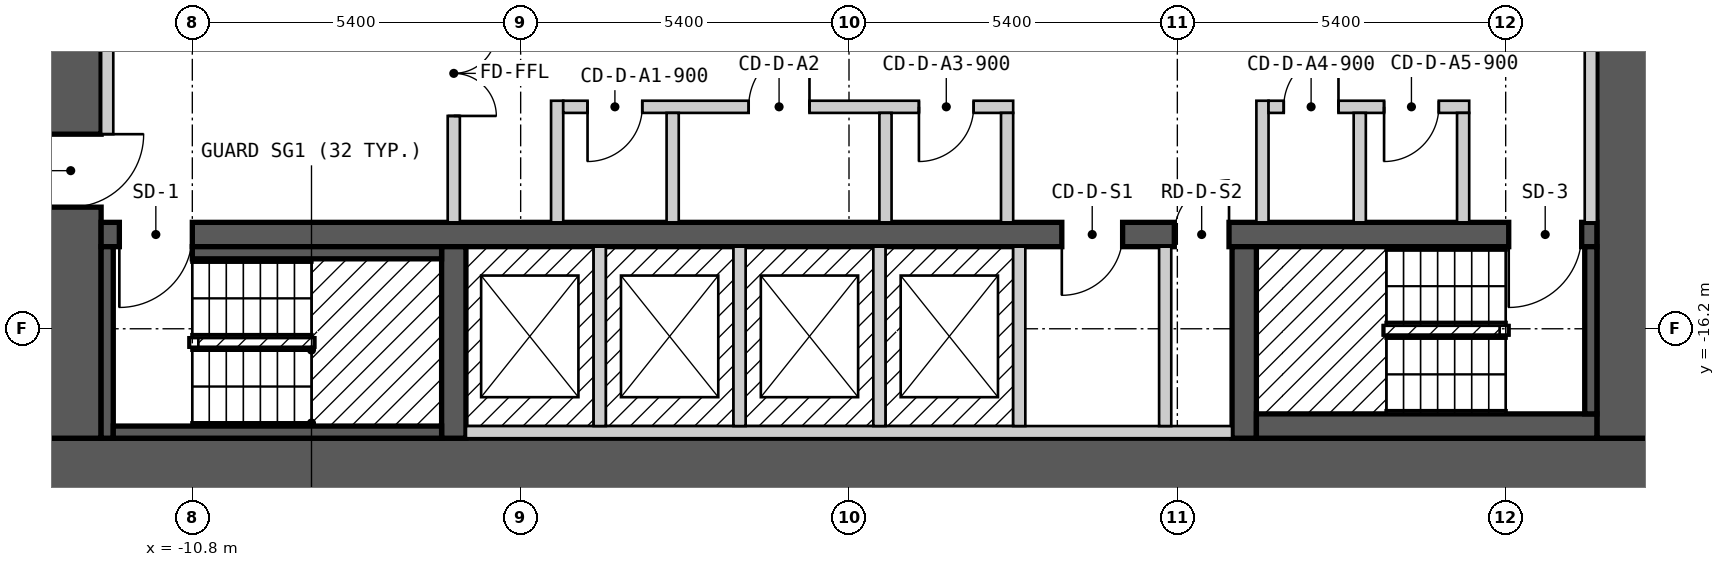
"""IFC4 building model, lengths in metres.
Left out: names, types, materials, properties, quantities, classifications, styles, units other than length and angle.
Written with IfcOpenShell. Run it as: python <this file> out.ifc"""

import sys

from ifc_helpers import new_model, si_unit, direction, frame, frame_2d, origin, place, context, subcontext, project, spatial, rectangle, extrude, element, fill, save


model = new_model("IFC4")
c1 = context("Model", 3, precision=1e-05, world=origin(), true_north=direction((0.0, 1.0)))
c2 = subcontext(c1, "Body", "Model", "MODEL_VIEW")
j1 = project(units=[si_unit("LENGTHUNIT", "METRE"), si_unit("PLANEANGLEUNIT", "RADIAN")], contexts=[c1])
p1 = place(None, origin())
s1 = spatial("IfcSite", under=j1, at=p1, CompositionType="ELEMENT")
p2 = place(p1, origin())
s2 = spatial("IfcBuilding", under=s1, at=p2, CompositionType="ELEMENT")
p3 = place(p2, frame((0.0, 0.0, 66.0)))
s3 = spatial("IfcBuildingStorey", under=s2, at=p3, CompositionType="ELEMENT", Elevation=66.0)
p4 = place(p3, frame((-13.3, -18.5, 0.0), z_axis=(0.0, 0.0, 1.0), x_axis=(1.0, 0.0, 0.0)))
e1 = element("IfcWall", 1, at=p4, inside=s3, PredefinedType="SHEAR", context=c2, shape_type="SweptSolid", body=[
    extrude(rectangle(XDim=26.6, YDim=1.0, at=frame_2d((13.3, 0.0))), origin(), (0.0, 0.0, 1.0), 5.7),
])
p5 = place(p3, frame((-12.8, -18.0, 0.0), z_axis=(0.0, 0.0, 1.0), x_axis=(0.0, 1.0, 0.0)))
e2 = element("IfcWall", 2, at=p5, inside=s3, PredefinedType="SHEAR", context=c2, shape_type="SweptSolid", body=[
    extrude(rectangle(XDim=12.0, YDim=1.0, at=frame_2d((6.0, 0.0))), origin(), (0.0, 0.0, 1.0), 5.7),
])
p6 = place(p5, frame((3.8, 0.0, 0.0)))
e3 = element("IfcOpeningElement", 3, at=p6, cuts=e2, PredefinedType="OPENING", context=c2, shape_type="SweptSolid", body=[
    extrude(rectangle(XDim=1.2, YDim=2.1, at=frame_2d((0.6, 1.05))), frame((0.0, 0.51, 0.0), z_axis=(0.0, -1.0, 0.0), x_axis=(1.0, 0.0, 0.0)), (0.0, 0.0, 1.0), 1.02),
])
p7 = place(p3, frame((12.8, -18.0, 0.0), z_axis=(0.0, 0.0, 1.0), x_axis=(0.0, 1.0, 0.0)))
e4 = element("IfcWall", 4, at=p7, inside=s3, PredefinedType="SHEAR", context=c2, shape_type="SweptSolid", body=[
    extrude(rectangle(XDim=12.0, YDim=1.0, at=frame_2d((6.0, 0.0))), origin(), (0.0, 0.0, 1.0), 5.7),
])
p8 = place(p3, frame((-12.3, -14.65, 0.0), z_axis=(0.0, 0.0, 1.0), x_axis=(1.0, 0.0, 0.0)))
e5 = element("IfcWall", 5, at=p8, inside=s3, PredefinedType="SHEAR", context=c2, shape_type="SweptSolid", body=[
    extrude(rectangle(XDim=24.6, YDim=0.4, at=frame_2d((12.3, 0.0))), origin(), (0.0, 0.0, 1.0), 5.7),
])
p9 = place(p8, frame((1.5, 0.0, 0.0), z_axis=(0.0, 0.0, 1.0), x_axis=(-1.0, 0.0, 0.0)))
e6 = element("IfcOpeningElement", 6, at=p9, cuts=e5, PredefinedType="OPENING", context=c2, shape_type="SweptSolid", body=[
    extrude(rectangle(XDim=1.2, YDim=2.1, at=frame_2d((0.6, 1.05))), frame((0.0, 0.21, 0.0), z_axis=(0.0, -1.0, 0.0), x_axis=(1.0, 0.0, 0.0)), (0.0, 0.0, 1.0), 0.42),
])
p10 = place(p8, frame((24.35, 0.0, 0.0), z_axis=(0.0, 0.0, 1.0), x_axis=(-1.0, 0.0, 0.0)))
e7 = element("IfcOpeningElement", 7, at=p10, cuts=e5, PredefinedType="OPENING", context=c2, shape_type="SweptSolid", body=[
    extrude(rectangle(XDim=1.2, YDim=2.1, at=frame_2d((0.6, 1.05))), frame((0.0, 0.21, 0.0), z_axis=(0.0, -1.0, 0.0), x_axis=(1.0, 0.0, 0.0)), (0.0, 0.0, 1.0), 0.42),
])
p11 = place(p8, frame((16.8, 0.0, 0.0), z_axis=(0.0, 0.0, 1.0), x_axis=(-1.0, 0.0, 0.0)))
e8 = element("IfcOpeningElement", 8, at=p11, cuts=e5, PredefinedType="OPENING", context=c2, shape_type="SweptSolid", body=[
    extrude(rectangle(XDim=1.0, YDim=2.1, at=frame_2d((0.5, 1.05))), frame((0.0, 0.21, 0.0), z_axis=(0.0, -1.0, 0.0), x_axis=(1.0, 0.0, 0.0)), (0.0, 0.0, 1.0), 0.42),
])
p12 = place(p8, frame((18.55, 0.0, 0.0), z_axis=(0.0, 0.0, 1.0), x_axis=(-1.0, 0.0, 0.0)))
e9 = element("IfcOpeningElement", 9, at=p12, cuts=e5, PredefinedType="OPENING", context=c2, shape_type="SweptSolid", body=[
    extrude(rectangle(XDim=0.9, YDim=2.1, at=frame_2d((0.45, 1.05))), frame((0.0, 0.21, 0.0), z_axis=(0.0, -1.0, 0.0), x_axis=(1.0, 0.0, 0.0)), (0.0, 0.0, 1.0), 0.42),
])
for number, where, z_axis, x_axis in (
    (10, (-6.5, -18.0, 0.0), (0.0, 0.0, 1.0), (0.0, 1.0, 0.0)),
    (11, (6.5, -18.0, 0.0), (0.0, 0.0, 1.0), (0.0, 1.0, 0.0)),
):
    element("IfcWall", number, at=place(p3, frame(where, z_axis=z_axis, x_axis=x_axis)), inside=s3, PredefinedType="SHEAR", context=c2, shape_type="SweptSolid", body=[
        extrude(rectangle(XDim=3.15, YDim=0.4, at=frame_2d((1.575, 0.0))), origin(), (0.0, 0.0, 1.0), 5.7),
    ])
p13 = place(p3, frame((-12.2, -18.0, 0.0), z_axis=(0.0, 0.0, 1.0), x_axis=(0.0, 1.0, 0.0)))
e12 = element("IfcWall", 12, at=p13, inside=s3, PredefinedType="SOLIDWALL", context=c2, shape_type="SweptSolid", body=[
    extrude(rectangle(XDim=3.15, YDim=0.2, at=frame_2d((1.575, 0.0))), origin(), (0.0, 0.0, 1.0), 5.7),
])
p14 = place(p3, frame((-12.2, -13.0, 0.0), z_axis=(0.0, 0.0, 1.0), x_axis=(0.0, 1.0, 0.0)))
e13 = element("IfcWall", 13, at=p14, inside=s3, PredefinedType="PARTITIONING", context=c2, shape_type="SweptSolid", body=[
    extrude(rectangle(XDim=3.45, YDim=0.2, at=frame_2d((1.725, 0.0))), origin(), (0.0, 0.0, 1.0), 5.7),
])
p15 = place(p3, frame((-12.1, -17.9, 0.0), z_axis=(0.0, 0.0, 1.0), x_axis=(1.0, 0.0, 0.0)))
e14 = element("IfcWall", 14, at=p15, inside=s3, PredefinedType="SOLIDWALL", context=c2, shape_type="SweptSolid", body=[
    extrude(rectangle(XDim=5.4, YDim=0.2, at=frame_2d((2.7, 0.0))), origin(), (0.0, 0.0, 1.0), 5.7),
])
p16 = place(p3, frame((-10.8, -14.95, 0.0), z_axis=(0.0, 0.0, 1.0), x_axis=(1.0, 0.0, 0.0)))
e15 = element("IfcWall", 15, at=p16, inside=s3, PredefinedType="SOLIDWALL", context=c2, shape_type="SweptSolid", body=[
    extrude(rectangle(XDim=4.1, YDim=0.2, at=frame_2d((2.05, 0.0))), origin(), (0.0, 0.0, 1.0), 5.7),
])
p17 = place(p3, frame((-6.5, -14.45, 0.0), z_axis=(0.0, 0.0, 1.0), x_axis=(0.0, 1.0, 0.0)))
e16 = element("IfcWall", 16, at=p17, inside=s3, PredefinedType="PARTITIONING", context=c2, shape_type="SweptSolid", body=[
    extrude(rectangle(XDim=4.9, YDim=0.2, at=frame_2d((2.45, 0.0))), origin(), (0.0, 0.0, 1.0), 5.7),
])
p18 = place(p17, frame((3.15, 0.0, 0.0), z_axis=(0.0, 0.0, 1.0), x_axis=(-1.0, 0.0, 0.0)))
e17 = element("IfcOpeningElement", 17, at=p18, cuts=e16, PredefinedType="OPENING", context=c2, shape_type="SweptSolid", body=[
    extrude(rectangle(XDim=1.4, YDim=2.1, at=frame_2d((0.7, 1.05))), frame((0.0, 0.11, 0.0), z_axis=(0.0, -1.0, 0.0), x_axis=(1.0, 0.0, 0.0)), (0.0, 0.0, 1.0), 0.22),
])
p19 = place(p3, frame((-6.3, -17.9, 0.0), z_axis=(0.0, 0.0, 1.0), x_axis=(1.0, 0.0, 0.0)))
e18 = element("IfcWall", 18, at=p19, inside=s3, PredefinedType="SOLIDWALL", context=c2, shape_type="SweptSolid", body=[
    extrude(rectangle(XDim=12.6, YDim=0.2, at=frame_2d((6.3, 0.0))), origin(), (0.0, 0.0, 1.0), 5.7),
])
p20 = place(p3, frame((-4.8, -14.45, 0.0), z_axis=(0.0, 0.0, 1.0), x_axis=(0.0, 1.0, 0.0)))
e19 = element("IfcWall", 19, at=p20, inside=s3, PredefinedType="PARTITIONING", context=c2, shape_type="SweptSolid", body=[
    extrude(rectangle(XDim=2.0, YDim=0.2, at=frame_2d((1.0, 0.0))), origin(), (0.0, 0.0, 1.0), 5.7),
])
p21 = place(p3, frame((-4.7, -12.55, 0.0), z_axis=(0.0, 0.0, 1.0), x_axis=(1.0, 0.0, 0.0)))
e20 = element("IfcWall", 20, at=p21, inside=s3, PredefinedType="PARTITIONING", context=c2, shape_type="SweptSolid", body=[
    extrude(rectangle(XDim=7.4, YDim=0.2, at=frame_2d((3.7, 0.0))), origin(), (0.0, 0.0, 1.0), 5.7),
])
p22 = place(p21, frame((1.3, 0.0, 0.0), z_axis=(0.0, 0.0, 1.0), x_axis=(-1.0, 0.0, 0.0)))
e21 = element("IfcOpeningElement", 21, at=p22, cuts=e20, PredefinedType="OPENING", context=c2, shape_type="SweptSolid", body=[
    extrude(rectangle(XDim=0.9, YDim=2.1, at=frame_2d((0.45, 1.05))), frame((0.0, 0.11, 0.0), z_axis=(0.0, -1.0, 0.0), x_axis=(1.0, 0.0, 0.0)), (0.0, 0.0, 1.0), 0.22),
])
p23 = place(p21, frame((4.05, 0.0, 0.0), z_axis=(0.0, 0.0, 1.0), x_axis=(-1.0, 0.0, 0.0)))
e22 = element("IfcOpeningElement", 22, at=p23, cuts=e20, PredefinedType="OPENING", context=c2, shape_type="SweptSolid", body=[
    extrude(rectangle(XDim=1.0, YDim=2.1, at=frame_2d((0.5, 1.05))), frame((0.0, 0.11, 0.0), z_axis=(0.0, -1.0, 0.0), x_axis=(1.0, 0.0, 0.0)), (0.0, 0.0, 1.0), 0.22),
])
p24 = place(p21, frame((6.75, 0.0, 0.0), z_axis=(0.0, 0.0, 1.0), x_axis=(-1.0, 0.0, 0.0)))
e23 = element("IfcOpeningElement", 23, at=p24, cuts=e20, PredefinedType="OPENING", context=c2, shape_type="SweptSolid", body=[
    extrude(rectangle(XDim=0.9, YDim=2.1, at=frame_2d((0.45, 1.05))), frame((0.0, 0.11, 0.0), z_axis=(0.0, -1.0, 0.0), x_axis=(1.0, 0.0, 0.0)), (0.0, 0.0, 1.0), 0.22),
])
p25 = place(p3, frame((-4.1, -17.8, 0.0), z_axis=(0.0, 0.0, 1.0), x_axis=(0.0, 1.0, 0.0)))
e24 = element("IfcWall", 24, at=p25, inside=s3, PredefinedType="SOLIDWALL", context=c2, shape_type="SweptSolid", body=[
    extrude(rectangle(XDim=2.95, YDim=0.2, at=frame_2d((1.475, 0.0))), origin(), (0.0, 0.0, 1.0), 5.7),
])
p26 = place(p3, frame((-2.9, -14.45, 0.0), z_axis=(0.0, 0.0, 1.0), x_axis=(0.0, 1.0, 0.0)))
e25 = element("IfcWall", 25, at=p26, inside=s3, PredefinedType="PARTITIONING", context=c2, shape_type="SweptSolid", body=[
    extrude(rectangle(XDim=1.8, YDim=0.2, at=frame_2d((0.9, 0.0))), origin(), (0.0, 0.0, 1.0), 5.7),
])
for number, where, z_axis, x_axis in (
    (26, (-1.8, -17.8, 0.0), (0.0, 0.0, 1.0), (0.0, 1.0, 0.0)),
    (27, (0.5, -17.8, 0.0), (0.0, 0.0, 1.0), (0.0, 1.0, 0.0)),
):
    element("IfcWall", number, at=place(p3, frame(where, z_axis=z_axis, x_axis=x_axis)), inside=s3, PredefinedType="SOLIDWALL", context=c2, shape_type="SweptSolid", body=[
        extrude(rectangle(XDim=2.95, YDim=0.2, at=frame_2d((1.475, 0.0))), origin(), (0.0, 0.0, 1.0), 5.7),
    ])
for number, where, z_axis, x_axis in (
    (28, (0.6, -14.45, 0.0), (0.0, 0.0, 1.0), (0.0, 1.0, 0.0)),
    (29, (2.6, -14.45, 0.0), (0.0, 0.0, 1.0), (0.0, 1.0, 0.0)),
):
    element("IfcWall", number, at=place(p3, frame(where, z_axis=z_axis, x_axis=x_axis)), inside=s3, PredefinedType="PARTITIONING", context=c2, shape_type="SweptSolid", body=[
        extrude(rectangle(XDim=1.8, YDim=0.2, at=frame_2d((0.9, 0.0))), origin(), (0.0, 0.0, 1.0), 5.7),
    ])
p27 = place(p3, frame((2.8, -17.8, 0.0), z_axis=(0.0, 0.0, 1.0), x_axis=(0.0, 1.0, 0.0)))
e30 = element("IfcWall", 30, at=p27, inside=s3, PredefinedType="SOLIDWALL", context=c2, shape_type="SweptSolid", body=[
    extrude(rectangle(XDim=2.95, YDim=0.2, at=frame_2d((1.475, 0.0))), origin(), (0.0, 0.0, 1.0), 5.7),
])
p28 = place(p3, frame((5.2, -17.8, 0.0), z_axis=(0.0, 0.0, 1.0), x_axis=(0.0, 1.0, 0.0)))
e31 = element("IfcWall", 31, at=p28, inside=s3, PredefinedType="PARTITIONING", context=c2, shape_type="SweptSolid", body=[
    extrude(rectangle(XDim=2.95, YDim=0.2, at=frame_2d((1.475, 0.0))), origin(), (0.0, 0.0, 1.0), 5.7),
])
p29 = place(p3, frame((6.7, -17.8, 0.0), z_axis=(0.0, 0.0, 1.0), x_axis=(1.0, 0.0, 0.0)))
e32 = element("IfcWall", 32, at=p29, inside=s3, PredefinedType="SOLIDWALL", context=c2, shape_type="SweptSolid", body=[
    extrude(rectangle(XDim=5.6, YDim=0.4, at=frame_2d((2.8, 0.0))), origin(), (0.0, 0.0, 1.0), 5.7),
])
p30 = place(p3, frame((6.8, -14.45, 0.0), z_axis=(0.0, 0.0, 1.0), x_axis=(0.0, 1.0, 0.0)))
e33 = element("IfcWall", 33, at=p30, inside=s3, PredefinedType="PARTITIONING", context=c2, shape_type="SweptSolid", body=[
    extrude(rectangle(XDim=2.0, YDim=0.2, at=frame_2d((1.0, 0.0))), origin(), (0.0, 0.0, 1.0), 5.7),
])
p31 = place(p3, frame((6.9, -12.55, 0.0), z_axis=(0.0, 0.0, 1.0), x_axis=(1.0, 0.0, 0.0)))
e34 = element("IfcWall", 34, at=p31, inside=s3, PredefinedType="PARTITIONING", context=c2, shape_type="SweptSolid", body=[
    extrude(rectangle(XDim=3.3, YDim=0.2, at=frame_2d((1.65, 0.0))), origin(), (0.0, 0.0, 1.0), 5.7),
])
p32 = place(p31, frame((1.15, 0.0, 0.0), z_axis=(0.0, 0.0, 1.0), x_axis=(-1.0, 0.0, 0.0)))
e35 = element("IfcOpeningElement", 35, at=p32, cuts=e34, PredefinedType="OPENING", context=c2, shape_type="SweptSolid", body=[
    extrude(rectangle(XDim=0.9, YDim=2.1, at=frame_2d((0.45, 1.05))), frame((0.0, 0.11, 0.0), z_axis=(0.0, -1.0, 0.0), x_axis=(1.0, 0.0, 0.0)), (0.0, 0.0, 1.0), 0.22),
])
p33 = place(p31, frame((2.8, 0.0, 0.0), z_axis=(0.0, 0.0, 1.0), x_axis=(-1.0, 0.0, 0.0)))
e36 = element("IfcOpeningElement", 36, at=p33, cuts=e34, PredefinedType="OPENING", context=c2, shape_type="SweptSolid", body=[
    extrude(rectangle(XDim=0.9, YDim=2.1, at=frame_2d((0.45, 1.05))), frame((0.0, 0.11, 0.0), z_axis=(0.0, -1.0, 0.0), x_axis=(1.0, 0.0, 0.0)), (0.0, 0.0, 1.0), 0.22),
])
for number, where, z_axis, x_axis in (
    (37, (8.4, -14.45, 0.0), (0.0, 0.0, 1.0), (0.0, 1.0, 0.0)),
    (38, (10.1, -14.45, 0.0), (0.0, 0.0, 1.0), (0.0, 1.0, 0.0)),
):
    element("IfcWall", number, at=place(p3, frame(where, z_axis=z_axis, x_axis=x_axis)), inside=s3, PredefinedType="PARTITIONING", context=c2, shape_type="SweptSolid", body=[
        extrude(rectangle(XDim=1.8, YDim=0.2, at=frame_2d((0.9, 0.0))), origin(), (0.0, 0.0, 1.0), 5.7),
    ])
p34 = place(p3, frame((12.2, -17.6, 0.0), z_axis=(0.0, 0.0, 1.0), x_axis=(0.0, 1.0, 0.0)))
e39 = element("IfcWall", 39, at=p34, inside=s3, PredefinedType="SOLIDWALL", context=c2, shape_type="SweptSolid", body=[
    extrude(rectangle(XDim=2.75, YDim=0.2, at=frame_2d((1.375, 0.0))), origin(), (0.0, 0.0, 1.0), 5.7),
])
p35 = place(p3, frame((12.2, -14.45, 0.0), z_axis=(0.0, 0.0, 1.0), x_axis=(0.0, 1.0, 0.0)))
e40 = element("IfcWall", 40, at=p35, inside=s3, PredefinedType="PARTITIONING", context=c2, shape_type="SweptSolid", body=[
    extrude(rectangle(XDim=8.25, YDim=0.2, at=frame_2d((4.125, 0.0))), origin(), (0.0, 0.0, 1.0), 5.7),
])
p36 = place(p9, origin())
e41 = element("IfcDoor", 41, at=p36, inside=s3, OperationType="SINGLE_SWING_RIGHT", PredefinedType="DOOR", context=c2, shape_type="SweptSolid", body=[
    extrude(rectangle(XDim=1.2, YDim=2.1, at=frame_2d((0.6, 1.05))), frame((0.0, 0.025, 0.0), z_axis=(0.0, -1.0, 0.0), x_axis=(1.0, 0.0, 0.0)), (0.0, 0.0, 1.0), 0.05),
])
fill(e6, e41)
p37 = place(p10, origin())
e42 = element("IfcDoor", 42, at=p37, inside=s3, OperationType="SINGLE_SWING_RIGHT", PredefinedType="DOOR", context=c2, shape_type="SweptSolid", body=[
    extrude(rectangle(XDim=1.2, YDim=2.1, at=frame_2d((0.6, 1.05))), frame((0.0, 0.025, 0.0), z_axis=(0.0, -1.0, 0.0), x_axis=(1.0, 0.0, 0.0)), (0.0, 0.0, 1.0), 0.05),
])
fill(e7, e42)
p38 = place(p6, origin())
e43 = element("IfcDoor", 43, at=p38, inside=s3, OperationType="SINGLE_SWING_RIGHT", PredefinedType="DOOR", context=c2, shape_type="SweptSolid", body=[
    extrude(rectangle(XDim=1.2, YDim=2.1, at=frame_2d((0.6, 1.05))), frame((0.0, 0.025, 0.0), z_axis=(0.0, -1.0, 0.0), x_axis=(1.0, 0.0, 0.0)), (0.0, 0.0, 1.0), 0.05),
])
fill(e3, e43)
p39 = place(p18, origin())
e44 = element("IfcDoor", 44, at=p39, inside=s3, OperationType="DOUBLE_DOOR_SINGLE_SWING", PredefinedType="DOOR", context=c2, shape_type="SweptSolid", body=[
    extrude(rectangle(XDim=1.4, YDim=2.1, at=frame_2d((0.7, 1.05))), frame((0.0, 0.025, 0.0), z_axis=(0.0, -1.0, 0.0), x_axis=(1.0, 0.0, 0.0)), (0.0, 0.0, 1.0), 0.05),
])
fill(e17, e44)
p40 = place(p22, origin())
e45 = element("IfcDoor", 45, at=p40, inside=s3, OperationType="SINGLE_SWING_RIGHT", PredefinedType="DOOR", context=c2, shape_type="SweptSolid", body=[
    extrude(rectangle(XDim=0.9, YDim=2.1, at=frame_2d((0.45, 1.05))), frame((0.0, 0.025, 0.0), z_axis=(0.0, -1.0, 0.0), x_axis=(1.0, 0.0, 0.0)), (0.0, 0.0, 1.0), 0.05),
])
fill(e21, e45)
p41 = place(p23, origin())
e46 = element("IfcDoor", 46, at=p41, inside=s3, OperationType="SINGLE_SWING_LEFT", PredefinedType="DOOR", context=c2, shape_type="SweptSolid", body=[
    extrude(rectangle(XDim=1.0, YDim=2.1, at=frame_2d((0.5, 1.05))), frame((0.0, 0.025, 0.0), z_axis=(0.0, -1.0, 0.0), x_axis=(1.0, 0.0, 0.0)), (0.0, 0.0, 1.0), 0.05),
])
fill(e22, e46)
p42 = place(p24, origin())
e47 = element("IfcDoor", 47, at=p42, inside=s3, OperationType="SINGLE_SWING_RIGHT", PredefinedType="DOOR", context=c2, shape_type="SweptSolid", body=[
    extrude(rectangle(XDim=0.9, YDim=2.1, at=frame_2d((0.45, 1.05))), frame((0.0, 0.025, 0.0), z_axis=(0.0, -1.0, 0.0), x_axis=(1.0, 0.0, 0.0)), (0.0, 0.0, 1.0), 0.05),
])
fill(e23, e47)
p43 = place(p32, origin())
e48 = element("IfcDoor", 48, at=p43, inside=s3, OperationType="SINGLE_SWING_LEFT", PredefinedType="DOOR", context=c2, shape_type="SweptSolid", body=[
    extrude(rectangle(XDim=0.9, YDim=2.1, at=frame_2d((0.45, 1.05))), frame((0.0, 0.025, 0.0), z_axis=(0.0, -1.0, 0.0), x_axis=(1.0, 0.0, 0.0)), (0.0, 0.0, 1.0), 0.05),
])
fill(e35, e48)
p44 = place(p33, origin())
e49 = element("IfcDoor", 49, at=p44, inside=s3, OperationType="SINGLE_SWING_RIGHT", PredefinedType="DOOR", context=c2, shape_type="SweptSolid", body=[
    extrude(rectangle(XDim=0.9, YDim=2.1, at=frame_2d((0.45, 1.05))), frame((0.0, 0.025, 0.0), z_axis=(0.0, -1.0, 0.0), x_axis=(1.0, 0.0, 0.0)), (0.0, 0.0, 1.0), 0.05),
])
fill(e36, e49)
p45 = place(p11, origin())
e50 = element("IfcDoor", 50, at=p45, inside=s3, OperationType="SINGLE_SWING_RIGHT", PredefinedType="DOOR", context=c2, shape_type="SweptSolid", body=[
    extrude(rectangle(XDim=1.0, YDim=2.1, at=frame_2d((0.5, 1.05))), frame((0.0, 0.025, 0.0), z_axis=(0.0, -1.0, 0.0), x_axis=(1.0, 0.0, 0.0)), (0.0, 0.0, 1.0), 0.05),
])
fill(e8, e50)
p46 = place(p12, origin())
e51 = element("IfcDoor", 51, at=p46, inside=s3, OperationType="SINGLE_SWING_LEFT", PredefinedType="DOOR", context=c2, shape_type="SweptSolid", body=[
    extrude(rectangle(XDim=0.9, YDim=2.1, at=frame_2d((0.45, 1.05))), frame((0.0, 0.025, 0.0), z_axis=(0.0, -1.0, 0.0), x_axis=(1.0, 0.0, 0.0)), (0.0, 0.0, 1.0), 0.05),
])
fill(e9, e51)
save(model, sys.argv[1])
